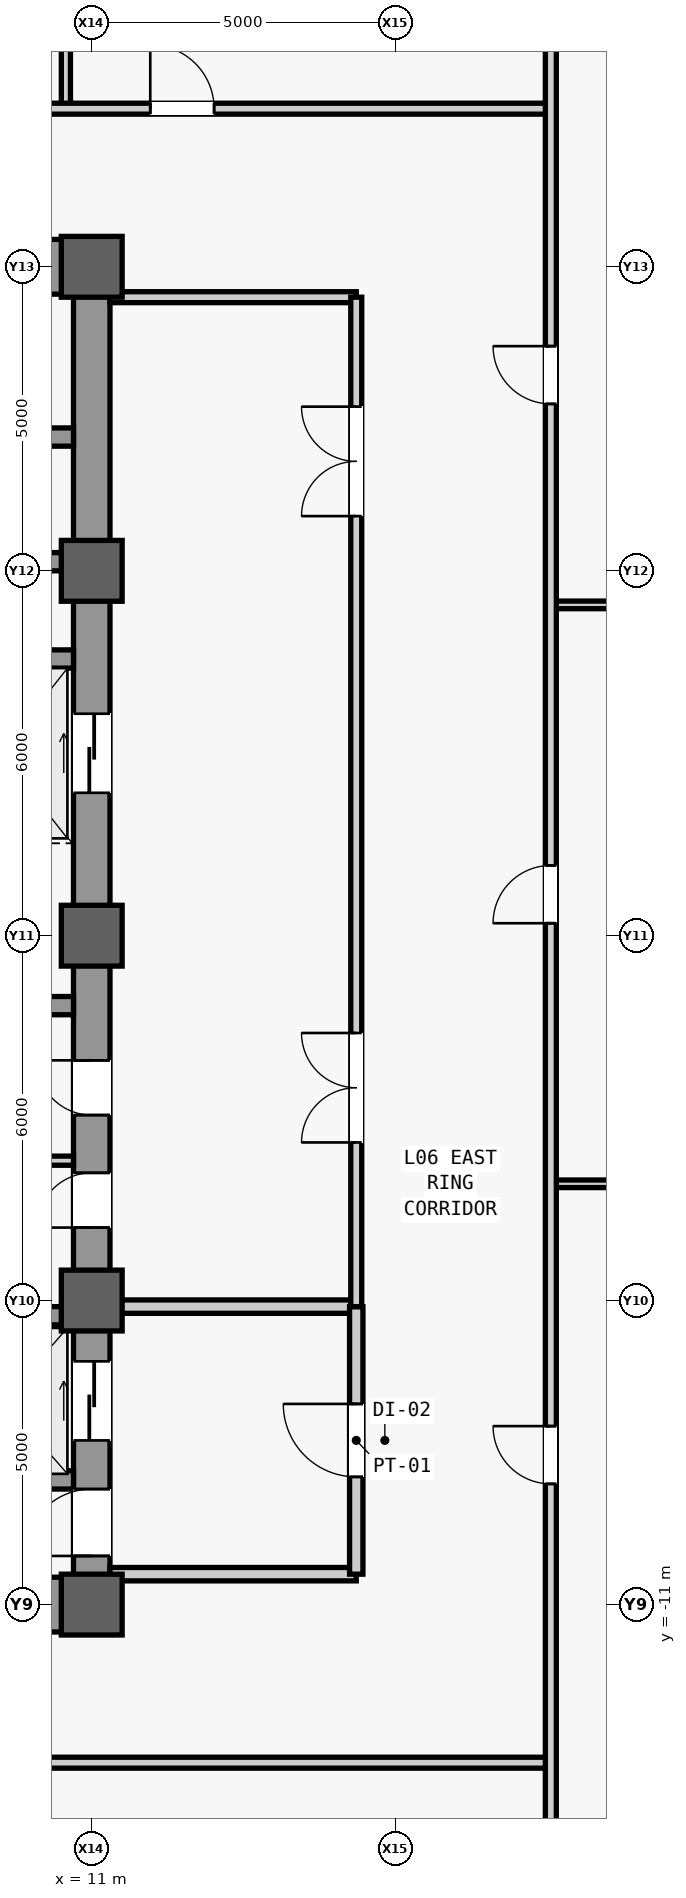
"""IFC4 building model, lengths in metres.
Left out: names, types, materials, properties, quantities, classifications, styles, units other than length and angle.
Written with IfcOpenShell. Run it as: python <this file> out.ifc"""

import sys

from ifc_helpers import new_model, si_unit, direction, frame, frame_2d, origin, origin_2d, place, context, subcontext, project, spatial, rectangle, extrude, source, transform, mapped, element, fill, save


model = new_model("IFC4")
c1 = context("Model", 3, precision=1e-05, world=origin(), true_north=direction((0.0, 1.0)))
c2 = subcontext(c1, "Body", "Model", "MODEL_VIEW")
j1 = project(units=[si_unit("LENGTHUNIT", "METRE"), si_unit("PLANEANGLEUNIT", "RADIAN")], contexts=[c1])
p1 = place(None, origin())
s1 = spatial("IfcSite", under=j1, at=p1, CompositionType="ELEMENT")
p2 = place(p1, origin())
s2 = spatial("IfcBuilding", under=s1, at=p2, CompositionType="ELEMENT")
p3 = place(p2, frame((0.0, 0.0, 32.6)))
s3 = spatial("IfcBuildingStorey", under=s2, at=p3, CompositionType="ELEMENT", Elevation=32.6)
m1 = source(origin(), c2, "Body", "SweptSolid", [
    extrude(rectangle(XDim=22.0, YDim=0.6, at=frame_2d((11.0, 0.0))), origin(), (0.0, 0.0, 1.0), 3.94),
])
p4 = place(p3, frame((11.0, -11.0, 0.0), z_axis=(0.0, 0.0, 1.0), x_axis=(0.0, 1.0, 0.0)))
e1 = element("IfcWall", 1, at=p4, inside=s3, PredefinedType="SHEAR", context=c2, shape_type="MappedRepresentation", body=[
    mapped(m1, transform((0.0, 0.0, 0.0), scale=1.0)),
])
m2 = source(origin(), c2, "Body", "SweptSolid", [
    extrude(rectangle(XDim=1.1, YDim=2.2, at=frame_2d((0.55, 1.1))), frame((0.0, 0.31, 0.0), z_axis=(0.0, -1.0, 0.0), x_axis=(1.0, 0.0, 0.0)), (0.0, 0.0, 1.0), 0.62),
])
p5 = place(p4, frame((0.8, 0.0, 0.0)))
e2 = element("IfcOpeningElement", 2, at=p5, cuts=e1, PredefinedType="OPENING", context=c2, shape_type="MappedRepresentation", body=[
    mapped(m2, transform((0.0, 0.0, 0.0), scale=1.0)),
])
m3 = source(origin(), c2, "Body", "SweptSolid", [
    extrude(rectangle(XDim=0.9, YDim=2.15, at=frame_2d((0.45, 1.075))), frame((0.0, 0.31, 0.0), z_axis=(0.0, -1.0, 0.0), x_axis=(1.0, 0.0, 0.0)), (0.0, 0.0, 1.0), 0.62),
])
p6 = place(p4, frame((6.2, 0.0, 0.0)))
e3 = element("IfcOpeningElement", 3, at=p6, cuts=e1, PredefinedType="OPENING", context=c2, shape_type="MappedRepresentation", body=[
    mapped(m3, transform((0.0, 0.0, 0.0), scale=1.0)),
])
p7 = place(p4, frame((8.05, 0.0, 0.0)))
e4 = element("IfcOpeningElement", 4, at=p7, cuts=e1, PredefinedType="OPENING", context=c2, shape_type="MappedRepresentation", body=[
    mapped(m3, transform((0.0, 0.0, 0.0), scale=1.0)),
])
m4 = source(origin(), c2, "Body", "SweptSolid", [
    extrude(rectangle(XDim=1.3, YDim=2.3, at=frame_2d((0.65, 1.15))), frame((0.0, 0.31, 0.0), z_axis=(0.0, -1.0, 0.0), x_axis=(1.0, 0.0, 0.0)), (0.0, 0.0, 1.0), 0.62),
])
p8 = place(p4, frame((2.7, 0.0, 0.0)))
e5 = element("IfcOpeningElement", 5, at=p8, cuts=e1, PredefinedType="OPENING", context=c2, shape_type="MappedRepresentation", body=[
    mapped(m4, transform((0.0, 0.0, 0.0), scale=1.0)),
])
p9 = place(p4, frame((13.35, 0.0, 0.0)))
e6 = element("IfcOpeningElement", 6, at=p9, cuts=e1, PredefinedType="OPENING", context=c2, shape_type="MappedRepresentation", body=[
    mapped(m4, transform((0.0, 0.0, 0.0), scale=1.0)),
])
m5 = source(origin(), c2, "Body", "SweptSolid", [
    extrude(rectangle(XDim=5.85, YDim=0.9, at=frame_2d((2.925, 0.0))), origin(), (0.0, 0.0, 1.0), 3.94),
])
p10 = place(p3, frame((4.85, -11.0, 0.0), z_axis=(0.0, 0.0, 1.0), x_axis=(1.0, 0.0, 0.0)))
e7 = element("IfcWall", 7, at=p10, inside=s3, PredefinedType="SHEAR", context=c2, shape_type="MappedRepresentation", body=[
    mapped(m5, transform((0.0, 0.0, 0.0), scale=1.0)),
])
p11 = place(p3, frame((4.85, 11.0, 0.0), z_axis=(0.0, 0.0, 1.0), x_axis=(1.0, 0.0, 0.0)))
e8 = element("IfcWall", 8, at=p11, inside=s3, PredefinedType="SHEAR", context=c2, shape_type="MappedRepresentation", body=[
    mapped(m5, transform((0.0, 0.0, 0.0), scale=1.0)),
])
m6 = source(origin(), c2, "Body", "SweptSolid", [
    extrude(rectangle(XDim=1.05, YDim=2.2, at=frame_2d((0.525, 1.1))), frame((0.0, 0.46, 0.0), z_axis=(0.0, -1.0, 0.0), x_axis=(1.0, 0.0, 0.0)), (0.0, 0.0, 1.0), 0.92),
])
p12 = place(p11, frame((1.375, 0.0, 0.0)))
e9 = element("IfcOpeningElement", 9, at=p12, cuts=e8, PredefinedType="OPENING", context=c2, shape_type="MappedRepresentation", body=[
    mapped(m6, transform((0.0, 0.0, 0.0), scale=1.0)),
])
m7 = source(origin(), c2, "Body", "SweptSolid", [
    extrude(rectangle(XDim=5.6, YDim=0.3, at=frame_2d((2.8, 0.0))), origin(), (0.0, 0.0, 1.0), 3.94),
])
p13 = place(p3, frame((5.1, -1.15, 0.0), z_axis=(0.0, 0.0, 1.0), x_axis=(1.0, 0.0, 0.0)))
e10 = element("IfcWall", 10, at=p13, inside=s3, PredefinedType="SHEAR", context=c2, shape_type="MappedRepresentation", body=[
    mapped(m7, transform((0.0, 0.0, 0.0), scale=1.0)),
])
m8 = source(origin(), c2, "Body", "SweptSolid", [
    extrude(rectangle(XDim=1.0, YDim=1.0, at=origin_2d()), origin(), (0.0, 0.0, 1.0), 4.2),
])
for number, where, z_axis, x_axis in (
    (11, (11.0, -11.0, 0.0), (0.0, 0.0, 1.0), (1.0, 0.0, 0.0)),
    (12, (11.0, -6.0, 0.0), (0.0, 0.0, 1.0), (1.0, 0.0, 0.0)),
    (13, (11.0, 0.0, 0.0), (0.0, 0.0, 1.0), (1.0, 0.0, 0.0)),
    (14, (11.0, 6.0, 0.0), (0.0, 0.0, 1.0), (1.0, 0.0, 0.0)),
    (15, (11.0, 11.0, 0.0), (0.0, 0.0, 1.0), (1.0, 0.0, 0.0)),
):
    element("IfcColumn", number, at=place(p3, frame(where, z_axis=z_axis, x_axis=x_axis)), inside=s3, PredefinedType="COLUMN", context=c2, shape_type="MappedRepresentation", body=[
        mapped(m8, transform((0.0, 0.0, 0.0), scale=1.0)),
    ])
m9 = source(origin(), c2, "Body", "SweptSolid", [
    extrude(rectangle(XDim=2.2, YDim=0.3, at=frame_2d((1.1, 0.0))), origin(), (0.0, 0.0, 1.0), 3.94),
])
for number, where, z_axis, x_axis in (
    (16, (8.5, -8.95, 0.0), (0.0, 0.0, 1.0), (1.0, 0.0, 0.0)),
    (17, (8.5, -6.25, 0.0), (0.0, 0.0, 1.0), (1.0, 0.0, 0.0)),
):
    element("IfcWall", number, at=place(p3, frame(where, z_axis=z_axis, x_axis=x_axis)), inside=s3, PredefinedType="SHEAR", context=c2, shape_type="MappedRepresentation", body=[
        mapped(m9, transform((0.0, 0.0, 0.0), scale=1.0)),
    ])
m10 = source(origin(), c2, "Body", "SweptSolid", [
    extrude(rectangle(XDim=2.3, YDim=0.3, at=frame_2d((1.15, 0.0))), origin(), (0.0, 0.0, 1.0), 3.94),
])
for number, where, z_axis, x_axis in (
    (18, (8.4, 4.55, 0.0), (0.0, 0.0, 1.0), (1.0, 0.0, 0.0)),
    (19, (8.4, 6.15, 0.0), (0.0, 0.0, 1.0), (1.0, 0.0, 0.0)),
    (20, (8.4, 8.2, 0.0), (0.0, 0.0, 1.0), (1.0, 0.0, 0.0)),
):
    element("IfcWall", number, at=place(p3, frame(where, z_axis=z_axis, x_axis=x_axis)), inside=s3, PredefinedType="SHEAR", context=c2, shape_type="MappedRepresentation", body=[
        mapped(m10, transform((0.0, 0.0, 0.0), scale=1.0)),
    ])
m11 = source(origin(), c2, "Body", "SweptSolid", [
    extrude(rectangle(XDim=2.05, YDim=0.15, at=frame_2d((1.025, 0.0))), origin(), (0.0, 0.0, 1.0), 3.94),
])
p14 = place(p3, frame((8.65, -3.7, 0.0), z_axis=(0.0, 0.0, 1.0), x_axis=(1.0, 0.0, 0.0)))
e21 = element("IfcWall", 21, at=p14, inside=s3, PredefinedType="PARTITIONING", context=c2, shape_type="MappedRepresentation", body=[
    mapped(m11, transform((0.0, 0.0, 0.0), scale=1.0)),
])
m12 = source(origin(), c2, "Body", "SweptSolid", [
    extrude(rectangle(XDim=4.05, YDim=0.22, at=frame_2d((2.025, 0.0))), origin(), (0.0, 0.0, 1.0), 3.94),
])
p15 = place(p3, frame((11.3, -10.5, 0.0), z_axis=(0.0, 0.0, 1.0), x_axis=(1.0, 0.0, 0.0)))
e22 = element("IfcWall", 22, at=p15, inside=s3, PredefinedType="PARTITIONING", context=c2, shape_type="MappedRepresentation", body=[
    mapped(m12, transform((0.0, 0.0, 0.0), scale=1.0)),
])
m13 = source(origin(), c2, "Body", "SweptSolid", [
    extrude(rectangle(XDim=4.05, YDim=0.22, at=frame_2d((2.025, 0.0))), origin(), (0.0, 0.0, 1.0), 3.085),
])
p16 = place(p3, frame((11.3, -6.1, 0.0), z_axis=(0.0, 0.0, 1.0), x_axis=(1.0, 0.0, 0.0)))
e23 = element("IfcWall", 23, at=p16, inside=s3, PredefinedType="PARTITIONING", context=c2, shape_type="MappedRepresentation", body=[
    mapped(m13, transform((0.0, 0.0, 0.0), scale=1.0)),
])
m14 = source(origin(), c2, "Body", "SweptSolid", [
    extrude(rectangle(XDim=4.4, YDim=0.22, at=frame_2d((2.2, 0.0))), origin(), (0.0, 0.0, 1.0), 3.94),
])
p17 = place(p3, frame((15.35, -10.5, 0.0), z_axis=(0.0, 0.0, 1.0), x_axis=(0.0, 1.0, 0.0)))
e24 = element("IfcWall", 24, at=p17, inside=s3, PredefinedType="PARTITIONING", context=c2, shape_type="MappedRepresentation", body=[
    mapped(m14, transform((0.0, 0.0, 0.0), scale=1.0)),
])
m15 = source(origin(), c2, "Body", "SweptSolid", [
    extrude(rectangle(XDim=1.2, YDim=2.2, at=frame_2d((0.6, 1.1))), frame((0.0, 0.12, 0.0), z_axis=(0.0, -1.0, 0.0), x_axis=(1.0, 0.0, 0.0)), (0.0, 0.0, 1.0), 0.24),
])
p18 = place(p17, frame((1.6, 0.0, 0.0)))
e25 = element("IfcOpeningElement", 25, at=p18, cuts=e24, PredefinedType="OPENING", context=c2, shape_type="MappedRepresentation", body=[
    mapped(m15, transform((0.0, 0.0, 0.0), scale=1.0)),
])
m16 = source(origin(), c2, "Body", "SweptSolid", [
    extrude(rectangle(XDim=4.05, YDim=0.18, at=frame_2d((2.025, 0.0))), origin(), (0.0, 0.0, 1.0), 3.94),
])
p19 = place(p3, frame((11.3, 10.5, 0.0), z_axis=(0.0, 0.0, 1.0), x_axis=(1.0, 0.0, 0.0)))
e26 = element("IfcWall", 26, at=p19, inside=s3, PredefinedType="PARTITIONING", context=c2, shape_type="MappedRepresentation", body=[
    mapped(m16, transform((0.0, 0.0, 0.0), scale=1.0)),
])
m17 = source(origin(), c2, "Body", "SweptSolid", [
    extrude(rectangle(XDim=16.6, YDim=0.18, at=frame_2d((8.3, 0.0))), origin(), (0.0, 0.0, 1.0), 3.94),
])
p20 = place(p3, frame((15.35, -6.1, 0.0), z_axis=(0.0, 0.0, 1.0), x_axis=(0.0, 1.0, 0.0)))
e27 = element("IfcWall", 27, at=p20, inside=s3, PredefinedType="PARTITIONING", context=c2, shape_type="MappedRepresentation", body=[
    mapped(m17, transform((0.0, 0.0, 0.0), scale=1.0)),
])
m18 = source(origin(), c2, "Body", "SweptSolid", [
    extrude(rectangle(XDim=1.8, YDim=2.25, at=frame_2d((0.9, 1.125))), frame((0.0, 0.1, 0.0), z_axis=(0.0, -1.0, 0.0), x_axis=(1.0, 0.0, 0.0)), (0.0, 0.0, 1.0), 0.2),
])
p21 = place(p20, frame((2.7, 0.0, 0.0)))
e28 = element("IfcOpeningElement", 28, at=p21, cuts=e27, PredefinedType="OPENING", context=c2, shape_type="MappedRepresentation", body=[
    mapped(m18, transform((0.0, 0.0, 0.0), scale=1.0)),
])
p22 = place(p20, frame((13.0, 0.0, 0.0)))
e29 = element("IfcOpeningElement", 29, at=p22, cuts=e27, PredefinedType="OPENING", context=c2, shape_type="MappedRepresentation", body=[
    mapped(m18, transform((0.0, 0.0, 0.0), scale=1.0)),
])
m19 = source(origin(), c2, "Body", "SweptSolid", [
    extrude(rectangle(XDim=36.25, YDim=0.18, at=frame_2d((18.125, 0.0))), origin(), (0.0, 0.0, 1.0), 3.94),
])
p23 = place(p3, frame((-17.7, -13.6, 0.0), z_axis=(0.0, 0.0, 1.0), x_axis=(1.0, 0.0, 0.0)))
e30 = element("IfcWall", 30, at=p23, inside=s3, PredefinedType="PARTITIONING", context=c2, shape_type="MappedRepresentation", body=[
    mapped(m19, transform((0.0, 0.0, 0.0), scale=1.0)),
])
m20 = source(origin(), c2, "Body", "SweptSolid", [
    extrude(rectangle(XDim=1.05, YDim=2.2, at=frame_2d((0.525, 1.1))), frame((0.0, 0.1, 0.0), z_axis=(0.0, -1.0, 0.0), x_axis=(1.0, 0.0, 0.0)), (0.0, 0.0, 1.0), 0.2),
])
p24 = place(p23, frame((17.175, 0.0, 0.0)))
e31 = element("IfcOpeningElement", 31, at=p24, cuts=e30, PredefinedType="OPENING", context=c2, shape_type="MappedRepresentation", body=[
    mapped(m20, transform((0.0, 0.0, 0.0), scale=1.0)),
])
m21 = source(origin(), c2, "Body", "SweptSolid", [
    extrude(rectangle(XDim=18.4, YDim=0.15, at=frame_2d((9.2, 0.0))), origin(), (0.0, 0.0, 1.0), 3.94),
])
p25 = place(p3, frame((10.575, 13.6, 0.0), z_axis=(0.0, 0.0, 1.0), x_axis=(0.0, 1.0, 0.0)))
e32 = element("IfcWall", 32, at=p25, inside=s3, PredefinedType="PARTITIONING", context=c2, shape_type="MappedRepresentation", body=[
    mapped(m21, transform((0.0, 0.0, 0.0), scale=1.0)),
])
p26 = place(p3, frame((-17.7, 13.6, 0.0), z_axis=(0.0, 0.0, 1.0), x_axis=(1.0, 0.0, 0.0)))
e33 = element("IfcWall", 33, at=p26, inside=s3, PredefinedType="PARTITIONING", context=c2, shape_type="MappedRepresentation", body=[
    mapped(m19, transform((0.0, 0.0, 0.0), scale=1.0)),
])
p27 = place(p26, frame((5.113, 0.0, 0.0)))
e34 = element("IfcOpeningElement", 34, at=p27, cuts=e33, PredefinedType="OPENING", context=c2, shape_type="MappedRepresentation", body=[
    mapped(m20, transform((0.0, 0.0, 0.0), scale=1.0)),
])
p28 = place(p26, frame((12.525, 0.0, 0.0)))
e35 = element("IfcOpeningElement", 35, at=p28, cuts=e33, PredefinedType="OPENING", context=c2, shape_type="MappedRepresentation", body=[
    mapped(m20, transform((0.0, 0.0, 0.0), scale=1.0)),
])
p29 = place(p26, frame((22.675, 0.0, 0.0)))
e36 = element("IfcOpeningElement", 36, at=p29, cuts=e33, PredefinedType="OPENING", context=c2, shape_type="MappedRepresentation", body=[
    mapped(m20, transform((0.0, 0.0, 0.0), scale=1.0)),
])
p30 = place(p26, frame((29.663, 0.0, 0.0)))
e37 = element("IfcOpeningElement", 37, at=p30, cuts=e33, PredefinedType="OPENING", context=c2, shape_type="MappedRepresentation", body=[
    mapped(m20, transform((0.0, 0.0, 0.0), scale=1.0)),
])
m22 = source(origin(), c2, "Body", "SweptSolid", [
    extrude(rectangle(XDim=13.45, YDim=0.125, at=frame_2d((6.725, 0.0))), origin(), (0.0, 0.0, 1.0), 3.94),
])
for number, where, z_axis, x_axis in (
    (38, (18.55, -4.08, 0.0), (0.0, 0.0, 1.0), (1.0, 0.0, 0.0)),
    (39, (18.55, 5.44, 0.0), (0.0, 0.0, 1.0), (1.0, 0.0, 0.0)),
):
    element("IfcWall", number, at=place(p3, frame(where, z_axis=z_axis, x_axis=x_axis)), inside=s3, PredefinedType="PARTITIONING", context=c2, shape_type="MappedRepresentation", body=[
        mapped(m22, transform((0.0, 0.0, 0.0), scale=1.0)),
    ])
m23 = source(origin(), c2, "Body", "SweptSolid", [
    extrude(rectangle(XDim=57.0, YDim=0.18, at=frame_2d((28.5, 0.0))), origin(), (0.0, 0.0, 1.0), 3.94),
])
p31 = place(p3, frame((18.55, -28.5, 0.0), z_axis=(0.0, 0.0, 1.0), x_axis=(0.0, 1.0, 0.0)))
e40 = element("IfcWall", 40, at=p31, inside=s3, PredefinedType="PARTITIONING", context=c2, shape_type="MappedRepresentation", body=[
    mapped(m23, transform((0.0, 0.0, 0.0), scale=1.0)),
])
m24 = source(origin(), c2, "Body", "SweptSolid", [
    extrude(rectangle(XDim=0.95, YDim=2.15, at=frame_2d((0.475, 1.075))), frame((0.0, 0.1, 0.0), z_axis=(0.0, -1.0, 0.0), x_axis=(1.0, 0.0, 0.0)), (0.0, 0.0, 1.0), 0.2),
])
p32 = place(p31, frame((19.485, 0.0, 0.0)))
e41 = element("IfcOpeningElement", 41, at=p32, cuts=e40, PredefinedType="OPENING", context=c2, shape_type="MappedRepresentation", body=[
    mapped(m24, transform((0.0, 0.0, 0.0), scale=1.0)),
])
p33 = place(p31, frame((28.705, 0.0, 0.0)))
e42 = element("IfcOpeningElement", 42, at=p33, cuts=e40, PredefinedType="OPENING", context=c2, shape_type="MappedRepresentation", body=[
    mapped(m24, transform((0.0, 0.0, 0.0), scale=1.0)),
])
p34 = place(p31, frame((37.245, 0.0, 0.0)))
e43 = element("IfcOpeningElement", 43, at=p34, cuts=e40, PredefinedType="OPENING", context=c2, shape_type="MappedRepresentation", body=[
    mapped(m24, transform((0.0, 0.0, 0.0), scale=1.0)),
])
m25 = source(origin(), c2, "Body", "SweptSolid", [
    extrude(rectangle(XDim=1.1, YDim=2.2, at=frame_2d((0.55, 1.1))), frame((0.0, 0.025, 0.0), z_axis=(0.0, -1.0, 0.0), x_axis=(1.0, 0.0, 0.0)), (0.0, 0.0, 1.0), 0.05),
])
p35 = place(p5, origin())
e44 = element("IfcDoor", 44, at=p35, inside=s3, OperationType="SINGLE_SWING_LEFT", PredefinedType="DOOR", context=c2, shape_type="MappedRepresentation", body=[
    mapped(m25, transform((0.0, 0.0, 0.0), scale=1.0)),
])
fill(e2, e44)
m26 = source(origin(), c2, "Body", "SweptSolid", [
    extrude(rectangle(XDim=0.9, YDim=2.15, at=frame_2d((0.45, 1.075))), frame((0.0, 0.025, 0.0), z_axis=(0.0, -1.0, 0.0), x_axis=(1.0, 0.0, 0.0)), (0.0, 0.0, 1.0), 0.05),
])
p36 = place(p6, origin())
e45 = element("IfcDoor", 45, at=p36, inside=s3, OperationType="SINGLE_SWING_LEFT", PredefinedType="DOOR", context=c2, shape_type="MappedRepresentation", body=[
    mapped(m26, transform((0.0, 0.0, 0.0), scale=1.0)),
])
fill(e3, e45)
p37 = place(p7, origin())
e46 = element("IfcDoor", 46, at=p37, inside=s3, OperationType="SINGLE_SWING_RIGHT", PredefinedType="DOOR", context=c2, shape_type="MappedRepresentation", body=[
    mapped(m26, transform((0.0, 0.0, 0.0), scale=1.0)),
])
fill(e4, e46)
m27 = source(origin(), c2, "Body", "SweptSolid", [
    extrude(rectangle(XDim=1.2, YDim=2.2, at=frame_2d((0.6, 1.1))), frame((0.0, 0.025, 0.0), z_axis=(0.0, -1.0, 0.0), x_axis=(1.0, 0.0, 0.0)), (0.0, 0.0, 1.0), 0.05),
])
p38 = place(p18, origin())
e47 = element("IfcDoor", 47, at=p38, inside=s3, OperationType="SINGLE_SWING_RIGHT", PredefinedType="DOOR", context=c2, shape_type="MappedRepresentation", body=[
    mapped(m27, transform((0.0, 0.0, 0.0), scale=1.0)),
])
fill(e25, e47)
m28 = source(origin(), c2, "Body", "SweptSolid", [
    extrude(rectangle(XDim=1.8, YDim=2.25, at=frame_2d((0.9, 1.125))), frame((0.0, 0.025, 0.0), z_axis=(0.0, -1.0, 0.0), x_axis=(1.0, 0.0, 0.0)), (0.0, 0.0, 1.0), 0.05),
])
p39 = place(p21, origin())
e48 = element("IfcDoor", 48, at=p39, inside=s3, OperationType="SINGLE_SWING_RIGHT", PredefinedType="DOOR", context=c2, shape_type="MappedRepresentation", body=[
    mapped(m28, transform((0.0, 0.0, 0.0), scale=1.0)),
])
fill(e28, e48)
p40 = place(p22, origin())
e49 = element("IfcDoor", 49, at=p40, inside=s3, OperationType="SINGLE_SWING_LEFT", PredefinedType="DOOR", context=c2, shape_type="MappedRepresentation", body=[
    mapped(m28, transform((0.0, 0.0, 0.0), scale=1.0)),
])
fill(e29, e49)
m29 = source(origin(), c2, "Body", "SweptSolid", [
    extrude(rectangle(XDim=1.05, YDim=2.2, at=frame_2d((0.525, 1.1))), frame((0.0, 0.025, 0.0), z_axis=(0.0, -1.0, 0.0), x_axis=(1.0, 0.0, 0.0)), (0.0, 0.0, 1.0), 0.05),
])
p41 = place(p30, origin())
e50 = element("IfcDoor", 50, at=p41, inside=s3, OperationType="SINGLE_SWING_LEFT", PredefinedType="DOOR", context=c2, shape_type="MappedRepresentation", body=[
    mapped(m29, transform((0.0, 0.0, 0.0), scale=1.0)),
])
fill(e37, e50)
m30 = source(origin(), c2, "Body", "SweptSolid", [
    extrude(rectangle(XDim=0.95, YDim=2.15, at=frame_2d((0.475, 1.075))), frame((0.0, 0.025, 0.0), z_axis=(0.0, -1.0, 0.0), x_axis=(1.0, 0.0, 0.0)), (0.0, 0.0, 1.0), 0.05),
])
p42 = place(p32, origin())
e51 = element("IfcDoor", 51, at=p42, inside=s3, OperationType="SINGLE_SWING_RIGHT", PredefinedType="DOOR", context=c2, shape_type="MappedRepresentation", body=[
    mapped(m30, transform((0.0, 0.0, 0.0), scale=1.0)),
])
fill(e41, e51)
p43 = place(p33, origin())
e52 = element("IfcDoor", 52, at=p43, inside=s3, OperationType="SINGLE_SWING_LEFT", PredefinedType="DOOR", context=c2, shape_type="MappedRepresentation", body=[
    mapped(m30, transform((0.0, 0.0, 0.0), scale=1.0)),
])
fill(e42, e52)
p44 = place(p34, origin())
e53 = element("IfcDoor", 53, at=p44, inside=s3, OperationType="SINGLE_SWING_RIGHT", PredefinedType="DOOR", context=c2, shape_type="MappedRepresentation", body=[
    mapped(m30, transform((0.0, 0.0, 0.0), scale=1.0)),
])
fill(e43, e53)
m31 = source(origin(), c2, "Body", "SweptSolid", [
    extrude(rectangle(XDim=1.3, YDim=2.3, at=frame_2d((0.65, 1.15))), frame((0.0, 0.025, 0.0), z_axis=(0.0, -1.0, 0.0), x_axis=(1.0, 0.0, 0.0)), (0.0, 0.0, 1.0), 0.05),
])
p45 = place(p8, origin())
e54 = element("IfcDoor", 54, at=p45, inside=s3, OperationType="SLIDING_TO_LEFT", PredefinedType="DOOR", context=c2, shape_type="MappedRepresentation", body=[
    mapped(m31, transform((0.0, 0.0, 0.0), scale=1.0)),
])
fill(e5, e54)
p46 = place(p9, origin())
e55 = element("IfcDoor", 55, at=p46, inside=s3, OperationType="SLIDING_TO_LEFT", PredefinedType="DOOR", context=c2, shape_type="MappedRepresentation", body=[
    mapped(m31, transform((0.0, 0.0, 0.0), scale=1.0)),
])
fill(e6, e55)
save(model, sys.argv[1])
